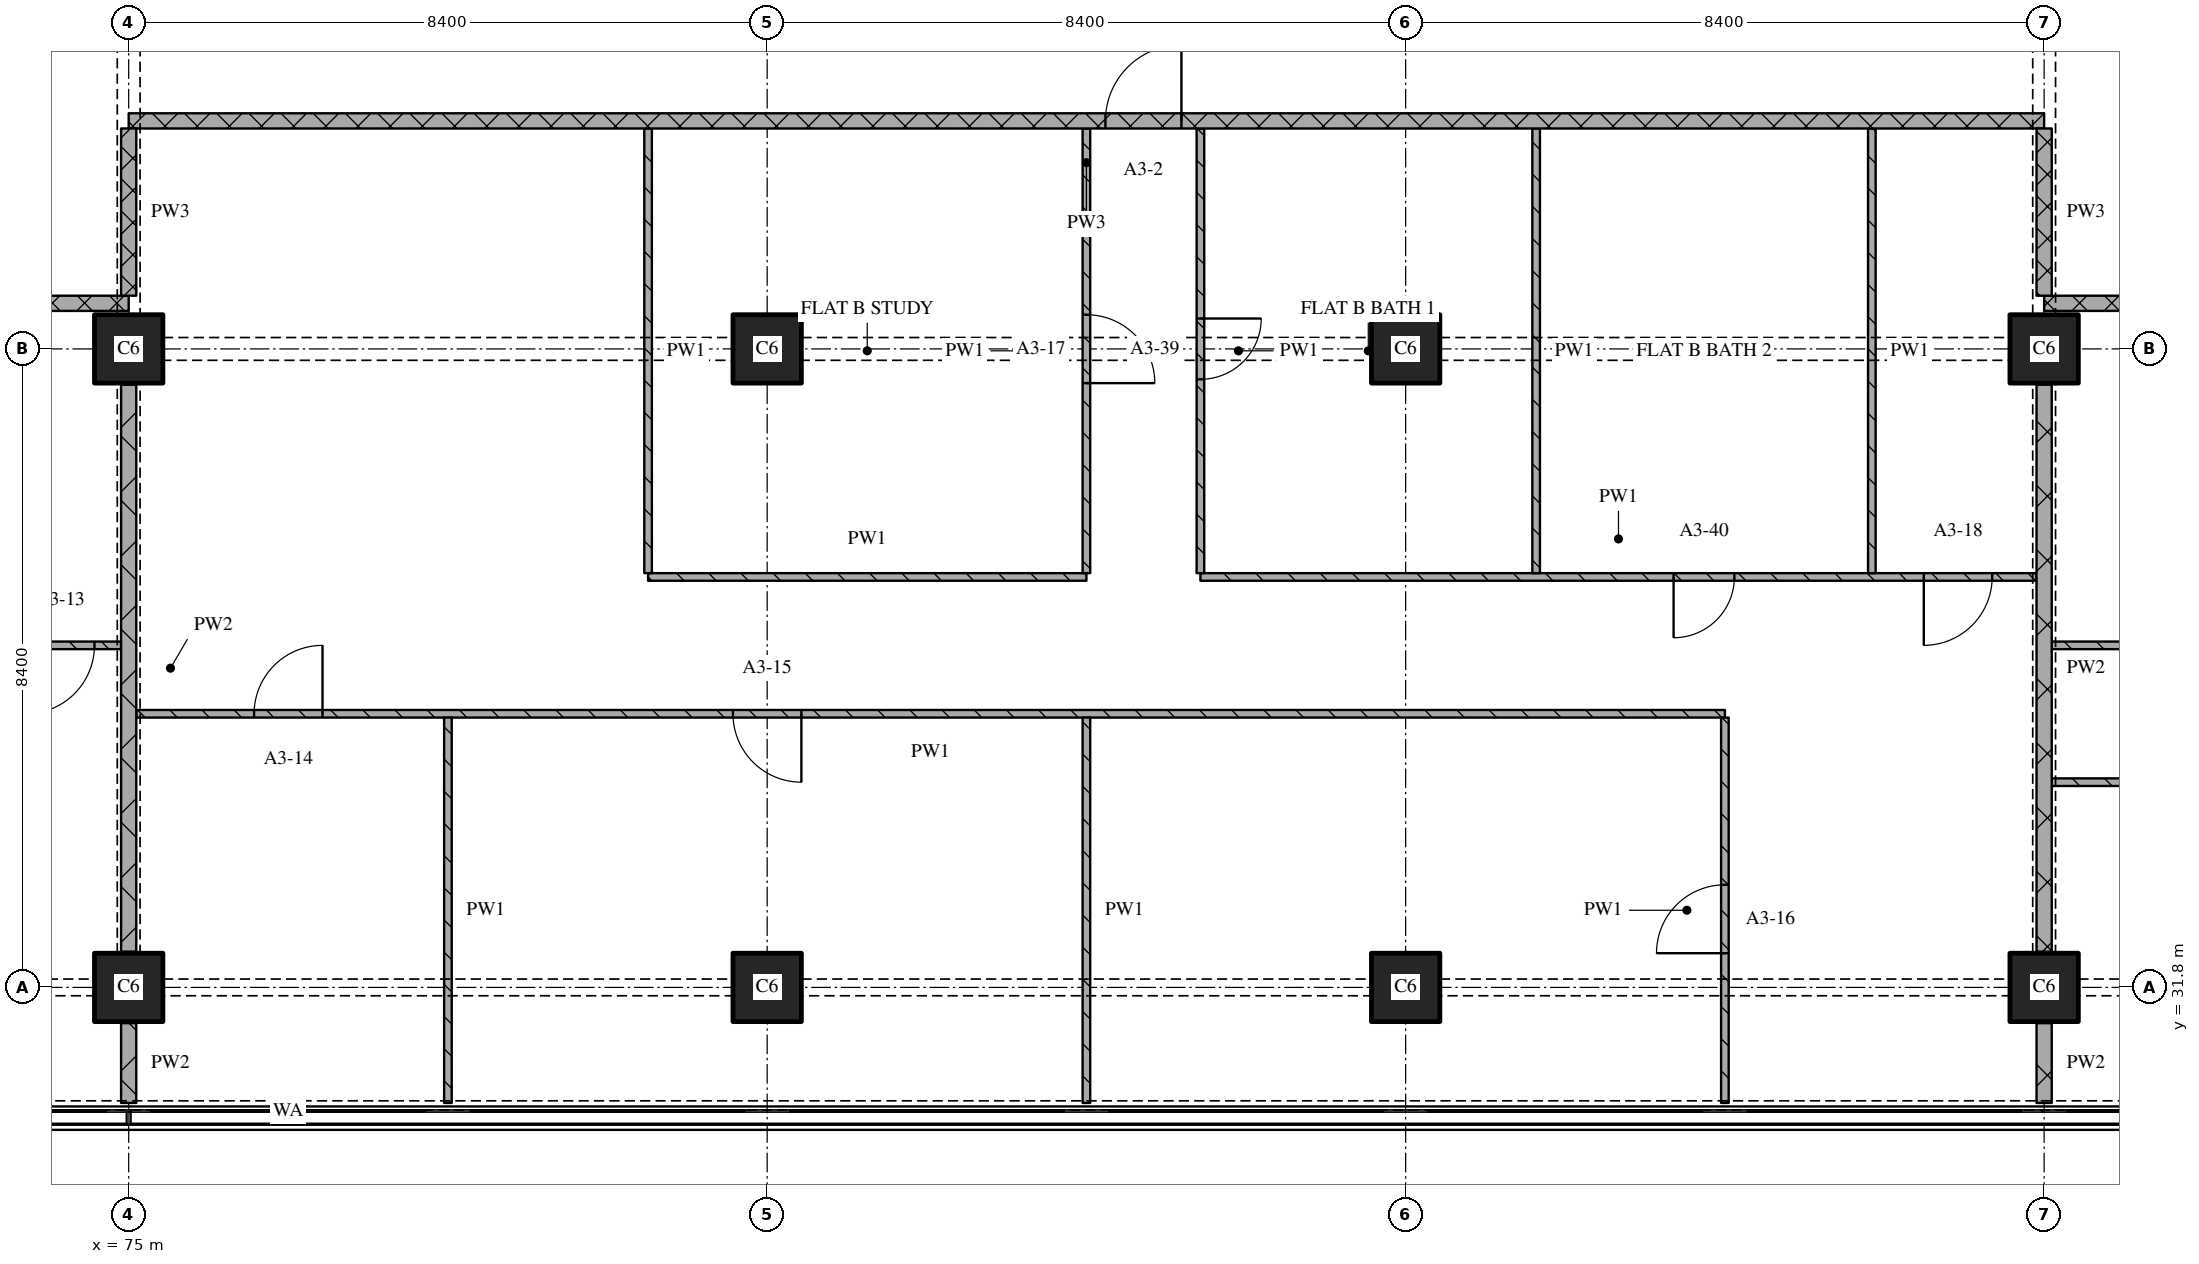
"""IFC4 building model, lengths in metres.
Left out: names, types, materials, properties, quantities, classifications, styles, units other than length and angle.
Written with IfcOpenShell. Run it as: python <this file> out.ifc"""

import sys

from ifc_helpers import new_model, si_unit, direction, frame, frame_2d, origin, origin_2d, place, context, subcontext, project, spatial, rectangle, extrude, element, fill, save


model = new_model("IFC4")
c1 = context("Model", 3, precision=1e-05, world=origin(), true_north=direction((0.0, 1.0)))
c2 = subcontext(c1, "Body", "Model", "MODEL_VIEW")
j1 = project(units=[si_unit("LENGTHUNIT", "METRE"), si_unit("PLANEANGLEUNIT", "RADIAN")], contexts=[c1])
p1 = place(None, origin())
s1 = spatial("IfcSite", under=j1, at=p1, CompositionType="ELEMENT")
p2 = place(p1, origin())
s2 = spatial("IfcBuilding", under=s1, at=p2, CompositionType="ELEMENT")
p3 = place(p2, frame((0.0, 0.0, 58.8)))
s3 = spatial("IfcBuildingStorey", under=s2, at=p3, CompositionType="ELEMENT", Elevation=58.8)
for number, where, z_axis, x_axis in (
    (1, (75.0, 31.8, 0.0), (0.0, 0.0, 1.0), (1.0, 0.0, 0.0)),
    (2, (75.0, 40.2, 0.0), (0.0, 0.0, 1.0), (1.0, 0.0, 0.0)),
    (3, (83.4, 31.8, 0.0), (0.0, 0.0, 1.0), (1.0, 0.0, 0.0)),
    (4, (83.4, 40.2, 0.0), (0.0, 0.0, 1.0), (1.0, 0.0, 0.0)),
    (5, (91.8, 31.8, 0.0), (0.0, 0.0, 1.0), (1.0, 0.0, 0.0)),
    (6, (91.8, 40.2, 0.0), (0.0, 0.0, 1.0), (1.0, 0.0, 0.0)),
    (7, (100.2, 31.8, 0.0), (0.0, 0.0, 1.0), (1.0, 0.0, 0.0)),
    (8, (100.2, 40.2, 0.0), (0.0, 0.0, 1.0), (1.0, 0.0, 0.0)),
):
    element("IfcColumn", number, at=place(p3, frame(where, z_axis=z_axis, x_axis=x_axis)), inside=s3, PredefinedType="COLUMN", context=c2, shape_type="SweptSolid", body=[
        extrude(rectangle(XDim=0.9, YDim=0.9, at=origin_2d()), origin(), (0.0, 0.0, 1.0), 3.6),
    ])
p4 = place(p3, frame((100.3, 34.5, 0.0), z_axis=(0.0, 0.0, 1.0), x_axis=(1.0, 0.0, 0.0)))
e9 = element("IfcWall", 9, at=p4, inside=s3, PredefinedType="PARTITIONING", context=c2, shape_type="SweptSolid", body=[
    extrude(rectangle(XDim=8.3, YDim=0.1, at=frame_2d((4.15, 0.0))), origin(), (0.0, 0.0, 1.0), 3.32),
])
p5 = place(p3, frame((96.0, 35.4, 0.0), z_axis=(0.0, 0.0, 1.0), x_axis=(-1.0, 0.0, 0.0)))
e10 = element("IfcWall", 10, at=p5, inside=s3, PredefinedType="PARTITIONING", context=c2, shape_type="SweptSolid", body=[
    extrude(rectangle(XDim=20.9, YDim=0.1, at=frame_2d((10.45, 0.0))), origin(), (0.0, 0.0, 1.0), 3.32),
])
p6 = place(p5, frame((12.15, 0.0, 0.0)))
e11 = element("IfcOpeningElement", 11, at=p6, cuts=e10, PredefinedType="OPENING", context=c2, shape_type="SweptSolid", body=[
    extrude(rectangle(XDim=0.9, YDim=2.1, at=frame_2d((0.45, 1.05))), frame((0.0, 0.06, 0.0), z_axis=(0.0, -1.0, 0.0), x_axis=(1.0, 0.0, 0.0)), (0.0, 0.0, 1.0), 0.12),
])
p7 = place(p5, frame((18.45, 0.0, 0.0)))
e12 = element("IfcOpeningElement", 12, at=p7, cuts=e10, PredefinedType="OPENING", context=c2, shape_type="SweptSolid", body=[
    extrude(rectangle(XDim=0.9, YDim=2.1, at=frame_2d((0.45, 1.05))), frame((0.0, 0.06, 0.0), z_axis=(0.0, -1.0, 0.0), x_axis=(1.0, 0.0, 0.0)), (0.0, 0.0, 1.0), 0.12),
])
p8 = place(p3, frame((64.2, 36.3, 0.0), z_axis=(0.0, 0.0, 1.0), x_axis=(1.0, 0.0, 0.0)))
e13 = element("IfcWall", 13, at=p8, inside=s3, PredefinedType="PARTITIONING", context=c2, shape_type="SweptSolid", body=[
    extrude(rectangle(XDim=10.7, YDim=0.1, at=frame_2d((5.35, 0.0))), origin(), (0.0, 0.0, 1.0), 3.32),
])
p9 = place(p8, frame((6.35, 0.0, 0.0)))
e14 = element("IfcOpeningElement", 14, at=p9, cuts=e13, PredefinedType="OPENING", context=c2, shape_type="SweptSolid", body=[
    extrude(rectangle(XDim=0.8, YDim=2.1, at=frame_2d((0.4, 1.05))), frame((0.0, 0.06, 0.0), z_axis=(0.0, -1.0, 0.0), x_axis=(1.0, 0.0, 0.0)), (0.0, 0.0, 1.0), 0.12),
])
p10 = place(p8, frame((9.45, 0.0, 0.0)))
e15 = element("IfcOpeningElement", 15, at=p10, cuts=e13, PredefinedType="OPENING", context=c2, shape_type="SweptSolid", body=[
    extrude(rectangle(XDim=0.9, YDim=2.1, at=frame_2d((0.45, 1.05))), frame((0.0, 0.06, 0.0), z_axis=(0.0, -1.0, 0.0), x_axis=(1.0, 0.0, 0.0)), (0.0, 0.0, 1.0), 0.12),
])
p11 = place(p3, frame((100.3, 36.3, 0.0), z_axis=(0.0, 0.0, 1.0), x_axis=(1.0, 0.0, 0.0)))
e16 = element("IfcWall", 16, at=p11, inside=s3, PredefinedType="PARTITIONING", context=c2, shape_type="SweptSolid", body=[
    extrude(rectangle(XDim=10.7, YDim=0.1, at=frame_2d((5.35, 0.0))), origin(), (0.0, 0.0, 1.0), 3.32),
])
p12 = place(p11, frame((1.75, 0.0, 0.0)))
e17 = element("IfcOpeningElement", 17, at=p12, cuts=e16, PredefinedType="OPENING", context=c2, shape_type="SweptSolid", body=[
    extrude(rectangle(XDim=0.8, YDim=2.1, at=frame_2d((0.4, 1.05))), frame((0.0, 0.06, 0.0), z_axis=(0.0, -1.0, 0.0), x_axis=(1.0, 0.0, 0.0)), (0.0, 0.0, 1.0), 0.12),
])
p13 = place(p11, frame((6.25, 0.0, 0.0)))
e18 = element("IfcOpeningElement", 18, at=p13, cuts=e16, PredefinedType="OPENING", context=c2, shape_type="SweptSolid", body=[
    extrude(rectangle(XDim=0.8, YDim=2.1, at=frame_2d((0.4, 1.05))), frame((0.0, 0.06, 0.0), z_axis=(0.0, -1.0, 0.0), x_axis=(1.0, 0.0, 0.0)), (0.0, 0.0, 1.0), 0.12),
])
p14 = place(p3, frame((81.833, 37.2, 0.0), z_axis=(0.0, 0.0, 1.0), x_axis=(1.0, 0.0, 0.0)))
e19 = element("IfcWall", 19, at=p14, inside=s3, PredefinedType="PARTITIONING", context=c2, shape_type="SweptSolid", body=[
    extrude(rectangle(XDim=5.767, YDim=0.1, at=frame_2d((2.883, 0.0))), origin(), (0.0, 0.0, 1.0), 3.32),
])
p15 = place(p3, frame((89.1, 37.2, 0.0), z_axis=(0.0, 0.0, 1.0), x_axis=(1.0, 0.0, 0.0)))
e20 = element("IfcWall", 20, at=p15, inside=s3, PredefinedType="PARTITIONING", context=c2, shape_type="SweptSolid", body=[
    extrude(rectangle(XDim=11.0, YDim=0.1, at=frame_2d((5.5, 0.0))), origin(), (0.0, 0.0, 1.0), 3.32),
])
p16 = place(p15, frame((6.225, 0.0, 0.0)))
e21 = element("IfcOpeningElement", 21, at=p16, cuts=e20, PredefinedType="OPENING", context=c2, shape_type="SweptSolid", body=[
    extrude(rectangle(XDim=0.8, YDim=2.1, at=frame_2d((0.4, 1.05))), frame((0.0, 0.06, 0.0), z_axis=(0.0, -1.0, 0.0), x_axis=(1.0, 0.0, 0.0)), (0.0, 0.0, 1.0), 0.12),
])
p17 = place(p15, frame((9.517, 0.0, 0.0)))
e22 = element("IfcOpeningElement", 22, at=p17, cuts=e20, PredefinedType="OPENING", context=c2, shape_type="SweptSolid", body=[
    extrude(rectangle(XDim=0.9, YDim=2.1, at=frame_2d((0.45, 1.05))), frame((0.0, 0.06, 0.0), z_axis=(0.0, -1.0, 0.0), x_axis=(1.0, 0.0, 0.0)), (0.0, 0.0, 1.0), 0.12),
])
p18 = place(p3, frame((75.0, 40.8, 0.0), z_axis=(0.0, 0.0, 1.0), x_axis=(-1.0, 0.0, 0.0)))
e23 = element("IfcWall", 23, at=p18, inside=s3, PredefinedType="PARTITIONING", context=c2, shape_type="SweptSolid", body=[
    extrude(rectangle(XDim=24.08, YDim=0.2, at=frame_2d((12.04, 0.0))), origin(), (0.0, 0.0, 1.0), 3.32),
])
p19 = place(p18, frame((11.05, 0.0, 0.0)))
e24 = element("IfcOpeningElement", 24, at=p19, cuts=e23, PredefinedType="OPENING", context=c2, shape_type="SweptSolid", body=[
    extrude(rectangle(XDim=1.0, YDim=2.1, at=frame_2d((0.5, 1.05))), frame((0.0, 0.11, 0.0), z_axis=(0.0, -1.0, 0.0), x_axis=(1.0, 0.0, 0.0)), (0.0, 0.0, 1.0), 0.22),
])
p20 = place(p3, frame((124.28, 40.8, 0.0), z_axis=(0.0, 0.0, 1.0), x_axis=(-1.0, 0.0, 0.0)))
e25 = element("IfcWall", 25, at=p20, inside=s3, PredefinedType="PARTITIONING", context=c2, shape_type="SweptSolid", body=[
    extrude(rectangle(XDim=24.08, YDim=0.2, at=frame_2d((12.04, 0.0))), origin(), (0.0, 0.0, 1.0), 3.32),
])
p21 = place(p20, frame((12.03, 0.0, 0.0)))
e26 = element("IfcOpeningElement", 26, at=p21, cuts=e25, PredefinedType="OPENING", context=c2, shape_type="SweptSolid", body=[
    extrude(rectangle(XDim=1.0, YDim=2.1, at=frame_2d((0.5, 1.05))), frame((0.0, 0.11, 0.0), z_axis=(0.0, -1.0, 0.0), x_axis=(1.0, 0.0, 0.0)), (0.0, 0.0, 1.0), 0.22),
])
p22 = place(p3, frame((100.2, 43.2, 0.0), z_axis=(0.0, 0.0, 1.0), x_axis=(-1.0, 0.0, 0.0)))
e27 = element("IfcWall", 27, at=p22, inside=s3, PredefinedType="PARTITIONING", context=c2, shape_type="SweptSolid", body=[
    extrude(rectangle(XDim=25.2, YDim=0.2, at=frame_2d((12.6, 0.0))), origin(), (0.0, 0.0, 1.0), 3.32),
])
p23 = place(p22, frame((11.35, 0.0, 0.0)))
e28 = element("IfcOpeningElement", 28, at=p23, cuts=e27, PredefinedType="OPENING", context=c2, shape_type="SweptSolid", body=[
    extrude(rectangle(XDim=1.0, YDim=2.1, at=frame_2d((0.5, 1.05))), frame((0.0, 0.11, 0.0), z_axis=(0.0, -1.0, 0.0), x_axis=(1.0, 0.0, 0.0)), (0.0, 0.0, 1.0), 0.22),
])
p24 = place(p3, frame((75.0, 43.1, 0.0), z_axis=(0.0, 0.0, 1.0), x_axis=(0.0, -1.0, 0.0)))
e29 = element("IfcWall", 29, at=p24, inside=s3, PredefinedType="PARTITIONING", context=c2, shape_type="SweptSolid", body=[
    extrude(rectangle(XDim=2.2, YDim=0.2, at=frame_2d((1.1, 0.0))), origin(), (0.0, 0.0, 1.0), 2.43),
])
p25 = place(p3, frame((75.0, 31.33, 0.0), z_axis=(0.0, 0.0, 1.0), x_axis=(0.0, -1.0, 0.0)))
e30 = element("IfcWall", 30, at=p25, inside=s3, PredefinedType="PARTITIONING", context=c2, shape_type="SweptSolid", body=[
    extrude(rectangle(XDim=1.05, YDim=0.2, at=frame_2d((0.525, 0.0))), origin(), (0.0, 0.0, 1.0), 3.32),
])
p26 = place(p3, frame((75.0, 39.73, 0.0), z_axis=(0.0, 0.0, 1.0), x_axis=(0.0, -1.0, 0.0)))
e31 = element("IfcWall", 31, at=p26, inside=s3, PredefinedType="PARTITIONING", context=c2, shape_type="SweptSolid", body=[
    extrude(rectangle(XDim=7.46, YDim=0.2, at=frame_2d((3.73, 0.0))), origin(), (0.0, 0.0, 1.0), 2.83),
])
p27 = place(p3, frame((79.2, 35.35, 0.0), z_axis=(0.0, 0.0, 1.0), x_axis=(0.0, -1.0, 0.0)))
e32 = element("IfcWall", 32, at=p27, inside=s3, PredefinedType="PARTITIONING", context=c2, shape_type="SweptSolid", body=[
    extrude(rectangle(XDim=5.07, YDim=0.1, at=frame_2d((2.535, 0.0))), origin(), (0.0, 0.0, 1.0), 3.32),
])
p28 = place(p3, frame((81.833, 43.1, 0.0), z_axis=(0.0, 0.0, 1.0), x_axis=(0.0, -1.0, 0.0)))
e33 = element("IfcWall", 33, at=p28, inside=s3, PredefinedType="PARTITIONING", context=c2, shape_type="SweptSolid", body=[
    extrude(rectangle(XDim=5.85, YDim=0.1, at=frame_2d((2.925, 0.0))), origin(), (0.0, 0.0, 1.0), 3.32),
])
p29 = place(p3, frame((87.6, 35.35, 0.0), z_axis=(0.0, 0.0, 1.0), x_axis=(0.0, -1.0, 0.0)))
e34 = element("IfcWall", 34, at=p29, inside=s3, PredefinedType="PARTITIONING", context=c2, shape_type="SweptSolid", body=[
    extrude(rectangle(XDim=5.07, YDim=0.1, at=frame_2d((2.535, 0.0))), origin(), (0.0, 0.0, 1.0), 3.32),
])
p30 = place(p3, frame((87.6, 37.25, 0.0), z_axis=(0.0, 0.0, 1.0), x_axis=(0.0, 1.0, 0.0)))
e35 = element("IfcWall", 35, at=p30, inside=s3, PredefinedType="PARTITIONING", context=c2, shape_type="SweptSolid", body=[
    extrude(rectangle(XDim=5.85, YDim=0.1, at=frame_2d((2.925, 0.0))), origin(), (0.0, 0.0, 1.0), 3.32),
])
p31 = place(p30, frame((2.5, 0.0, 0.0)))
e36 = element("IfcOpeningElement", 36, at=p31, cuts=e35, PredefinedType="OPENING", context=c2, shape_type="SweptSolid", body=[
    extrude(rectangle(XDim=0.9, YDim=2.1, at=frame_2d((0.45, 1.05))), frame((0.0, 0.06, 0.0), z_axis=(0.0, -1.0, 0.0), x_axis=(1.0, 0.0, 0.0)), (0.0, 0.0, 1.0), 0.12),
])
p32 = place(p3, frame((89.1, 43.1, 0.0), z_axis=(0.0, 0.0, 1.0), x_axis=(0.0, -1.0, 0.0)))
e37 = element("IfcWall", 37, at=p32, inside=s3, PredefinedType="PARTITIONING", context=c2, shape_type="SweptSolid", body=[
    extrude(rectangle(XDim=5.85, YDim=0.1, at=frame_2d((2.925, 0.0))), origin(), (0.0, 0.0, 1.0), 3.32),
])
p33 = place(p32, frame((2.5, 0.0, 0.0)))
e38 = element("IfcOpeningElement", 38, at=p33, cuts=e37, PredefinedType="OPENING", context=c2, shape_type="SweptSolid", body=[
    extrude(rectangle(XDim=0.8, YDim=2.1, at=frame_2d((0.4, 1.05))), frame((0.0, 0.06, 0.0), z_axis=(0.0, -1.0, 0.0), x_axis=(1.0, 0.0, 0.0)), (0.0, 0.0, 1.0), 0.12),
])
p34 = place(p3, frame((93.517, 43.1, 0.0), z_axis=(0.0, 0.0, 1.0), x_axis=(0.0, -1.0, 0.0)))
e39 = element("IfcWall", 39, at=p34, inside=s3, PredefinedType="PARTITIONING", context=c2, shape_type="SweptSolid", body=[
    extrude(rectangle(XDim=5.85, YDim=0.1, at=frame_2d((2.925, 0.0))), origin(), (0.0, 0.0, 1.0), 3.32),
])
p35 = place(p3, frame((96.0, 30.28, 0.0), z_axis=(0.0, 0.0, 1.0), x_axis=(0.0, 1.0, 0.0)))
e40 = element("IfcWall", 40, at=p35, inside=s3, PredefinedType="PARTITIONING", context=c2, shape_type="SweptSolid", body=[
    extrude(rectangle(XDim=5.07, YDim=0.1, at=frame_2d((2.535, 0.0))), origin(), (0.0, 0.0, 1.0), 3.32),
])
p36 = place(p35, frame((1.97, 0.0, 0.0)))
e41 = element("IfcOpeningElement", 41, at=p36, cuts=e40, PredefinedType="OPENING", context=c2, shape_type="SweptSolid", body=[
    extrude(rectangle(XDim=0.9, YDim=2.1, at=frame_2d((0.45, 1.05))), frame((0.0, 0.06, 0.0), z_axis=(0.0, -1.0, 0.0), x_axis=(1.0, 0.0, 0.0)), (0.0, 0.0, 1.0), 0.12),
])
p37 = place(p3, frame((97.933, 43.1, 0.0), z_axis=(0.0, 0.0, 1.0), x_axis=(0.0, -1.0, 0.0)))
e42 = element("IfcWall", 42, at=p37, inside=s3, PredefinedType="PARTITIONING", context=c2, shape_type="SweptSolid", body=[
    extrude(rectangle(XDim=5.85, YDim=0.1, at=frame_2d((2.925, 0.0))), origin(), (0.0, 0.0, 1.0), 3.32),
])
p38 = place(p3, frame((100.2, 43.1, 0.0), z_axis=(0.0, 0.0, 1.0), x_axis=(0.0, -1.0, 0.0)))
e43 = element("IfcWall", 43, at=p38, inside=s3, PredefinedType="PARTITIONING", context=c2, shape_type="SweptSolid", body=[
    extrude(rectangle(XDim=2.2, YDim=0.2, at=frame_2d((1.1, 0.0))), origin(), (0.0, 0.0, 1.0), 2.43),
])
p39 = place(p3, frame((100.2, 31.33, 0.0), z_axis=(0.0, 0.0, 1.0), x_axis=(0.0, -1.0, 0.0)))
e44 = element("IfcWall", 44, at=p39, inside=s3, PredefinedType="PARTITIONING", context=c2, shape_type="SweptSolid", body=[
    extrude(rectangle(XDim=1.05, YDim=0.2, at=frame_2d((0.525, 0.0))), origin(), (0.0, 0.0, 1.0), 3.32),
])
p40 = place(p3, frame((100.2, 39.73, 0.0), z_axis=(0.0, 0.0, 1.0), x_axis=(0.0, -1.0, 0.0)))
e45 = element("IfcWall", 45, at=p40, inside=s3, PredefinedType="PARTITIONING", context=c2, shape_type="SweptSolid", body=[
    extrude(rectangle(XDim=7.46, YDim=0.2, at=frame_2d((3.73, 0.0))), origin(), (0.0, 0.0, 1.0), 2.83),
])
p41 = place(p6, origin())
e46 = element("IfcDoor", 46, at=p41, inside=s3, OperationType="SINGLE_SWING_LEFT", PredefinedType="DOOR", context=c2, shape_type="SweptSolid", body=[
    extrude(rectangle(XDim=0.9, YDim=2.1, at=frame_2d((0.45, 1.05))), frame((0.0, 0.025, 0.0), z_axis=(0.0, -1.0, 0.0), x_axis=(1.0, 0.0, 0.0)), (0.0, 0.0, 1.0), 0.05),
])
fill(e11, e46)
p42 = place(p7, origin())
e47 = element("IfcDoor", 47, at=p42, inside=s3, OperationType="SINGLE_SWING_RIGHT", PredefinedType="DOOR", context=c2, shape_type="SweptSolid", body=[
    extrude(rectangle(XDim=0.9, YDim=2.1, at=frame_2d((0.45, 1.05))), frame((0.0, 0.025, 0.0), z_axis=(0.0, -1.0, 0.0), x_axis=(1.0, 0.0, 0.0)), (0.0, 0.0, 1.0), 0.05),
])
fill(e12, e47)
p43 = place(p10, origin())
e48 = element("IfcDoor", 48, at=p43, inside=s3, OperationType="SINGLE_SWING_RIGHT", PredefinedType="DOOR", context=c2, shape_type="SweptSolid", body=[
    extrude(rectangle(XDim=0.9, YDim=2.1, at=frame_2d((0.45, 1.05))), frame((0.0, 0.025, 0.0), z_axis=(0.0, -1.0, 0.0), x_axis=(1.0, 0.0, 0.0)), (0.0, 0.0, 1.0), 0.05),
])
fill(e15, e48)
p44 = place(p16, origin())
e49 = element("IfcDoor", 49, at=p44, inside=s3, OperationType="SINGLE_SWING_RIGHT", PredefinedType="DOOR", context=c2, shape_type="SweptSolid", body=[
    extrude(rectangle(XDim=0.8, YDim=2.1, at=frame_2d((0.4, 1.05))), frame((0.0, 0.025, 0.0), z_axis=(0.0, -1.0, 0.0), x_axis=(1.0, 0.0, 0.0)), (0.0, 0.0, 1.0), 0.05),
])
fill(e21, e49)
p45 = place(p17, origin())
e50 = element("IfcDoor", 50, at=p45, inside=s3, OperationType="SINGLE_SWING_RIGHT", PredefinedType="DOOR", context=c2, shape_type="SweptSolid", body=[
    extrude(rectangle(XDim=0.9, YDim=2.1, at=frame_2d((0.45, 1.05))), frame((0.0, 0.025, 0.0), z_axis=(0.0, -1.0, 0.0), x_axis=(1.0, 0.0, 0.0)), (0.0, 0.0, 1.0), 0.05),
])
fill(e22, e50)
p46 = place(p23, origin())
e51 = element("IfcDoor", 51, at=p46, inside=s3, OperationType="SINGLE_SWING_RIGHT", PredefinedType="DOOR", context=c2, shape_type="SweptSolid", body=[
    extrude(rectangle(XDim=1.0, YDim=2.1, at=frame_2d((0.5, 1.05))), frame((0.0, 0.025, 0.0), z_axis=(0.0, -1.0, 0.0), x_axis=(1.0, 0.0, 0.0)), (0.0, 0.0, 1.0), 0.05),
])
fill(e28, e51)
p47 = place(p31, origin())
e52 = element("IfcDoor", 52, at=p47, inside=s3, OperationType="SINGLE_SWING_RIGHT", PredefinedType="DOOR", context=c2, shape_type="SweptSolid", body=[
    extrude(rectangle(XDim=0.9, YDim=2.1, at=frame_2d((0.45, 1.05))), frame((0.0, 0.025, 0.0), z_axis=(0.0, -1.0, 0.0), x_axis=(1.0, 0.0, 0.0)), (0.0, 0.0, 1.0), 0.05),
])
fill(e36, e52)
p48 = place(p33, origin())
e53 = element("IfcDoor", 53, at=p48, inside=s3, OperationType="SINGLE_SWING_LEFT", PredefinedType="DOOR", context=c2, shape_type="SweptSolid", body=[
    extrude(rectangle(XDim=0.8, YDim=2.1, at=frame_2d((0.4, 1.05))), frame((0.0, 0.025, 0.0), z_axis=(0.0, -1.0, 0.0), x_axis=(1.0, 0.0, 0.0)), (0.0, 0.0, 1.0), 0.05),
])
fill(e38, e53)
p49 = place(p36, origin())
e54 = element("IfcDoor", 54, at=p49, inside=s3, OperationType="SINGLE_SWING_LEFT", PredefinedType="DOOR", context=c2, shape_type="SweptSolid", body=[
    extrude(rectangle(XDim=0.9, YDim=2.1, at=frame_2d((0.45, 1.05))), frame((0.0, 0.025, 0.0), z_axis=(0.0, -1.0, 0.0), x_axis=(1.0, 0.0, 0.0)), (0.0, 0.0, 1.0), 0.05),
])
fill(e41, e54)
save(model, sys.argv[1])
